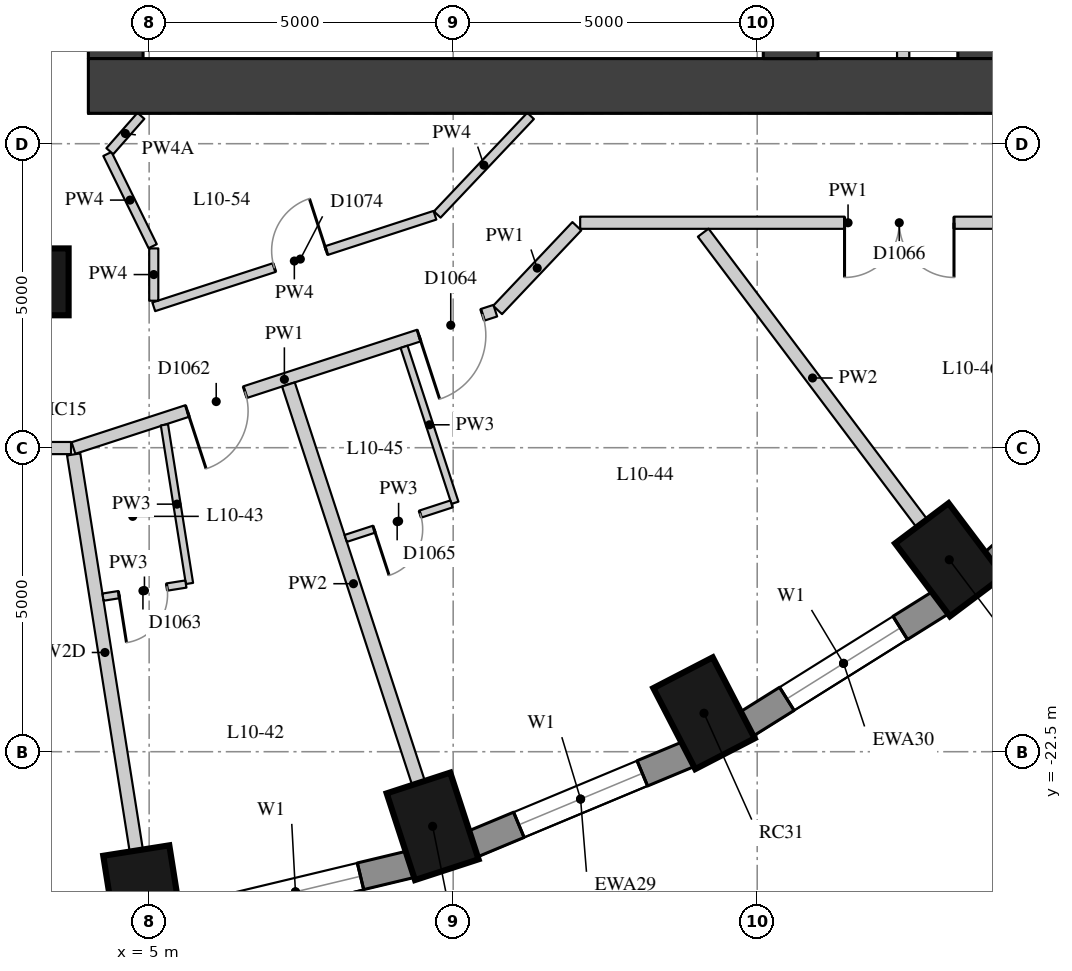
"""IFC4 building model, lengths in metres.
Left out: names, types, materials, properties, quantities, classifications, styles, units other than length and angle.
Written with IfcOpenShell. Run it as: python <this file> out.ifc"""

import sys

from ifc_helpers import new_model, si_unit, direction, frame, frame_2d, origin, origin_2d, place, context, subcontext, project, spatial, rectangle, extrude, element, fill, save


model = new_model("IFC4")
c1 = context("Model", 3, precision=1e-05, world=origin(), true_north=direction((0.0, 1.0)))
c2 = subcontext(c1, "Body", "Model", "MODEL_VIEW")
j1 = project(units=[si_unit("LENGTHUNIT", "METRE"), si_unit("PLANEANGLEUNIT", "RADIAN")], contexts=[c1])
p1 = place(None, origin())
s1 = spatial("IfcSite", under=j1, at=p1, CompositionType="ELEMENT")
p2 = place(p1, origin())
s2 = spatial("IfcBuilding", under=s1, at=p2, CompositionType="ELEMENT")
p3 = place(p2, frame((0.0, 0.0, 41.5)))
s3 = spatial("IfcBuildingStorey", under=s2, at=p3, CompositionType="ELEMENT", Elevation=41.5)
for number, where, z_axis, x_axis in (
    (1, (4.906, -24.866, 0.0), (0.0, 0.0, 1.0), (0.156, -0.988, 0.0)),
    (2, (9.662, -23.727, 0.0), (0.0, 0.0, 1.0), (0.31, -0.951, 0.0)),
    (3, (14.125, -21.867, 0.0), (0.0, 0.0, 1.0), (0.46, -0.888, 0.0)),
    (4, (18.159, -19.343, 0.0), (0.0, 0.0, 1.0), (0.601, -0.799, 0.0)),
):
    element("IfcColumn", number, at=place(p3, frame(where, z_axis=z_axis, x_axis=x_axis)), inside=s3, PredefinedType="COLUMN", context=c2, shape_type="SweptSolid", body=[
        extrude(rectangle(XDim=1.5, YDim=1.1, at=origin_2d()), origin(), (0.0, 0.0, 1.0), 3.3),
    ])
p4 = place(p3, frame((3.126, -14.772, 0.0), z_axis=(0.0, 0.0, 1.0), x_axis=(1.0, 0.0, 0.0)))
e5 = element("IfcColumn", 5, at=p4, inside=s3, PredefinedType="COLUMN", context=c2, shape_type="SweptSolid", body=[
    extrude(rectangle(XDim=1.1, YDim=1.1, at=origin_2d()), origin(), (0.0, 0.0, 1.0), 3.3),
])
p5 = place(p3, frame((5.504, -25.26, 0.0), z_axis=(0.0, 0.0, 1.0), x_axis=(0.972496561493, 0.232917233979, 0.0)))
e6 = element("IfcWall", 6, at=p5, inside=s3, PredefinedType="SOLIDWALL", context=c2, shape_type="SweptSolid", body=[
    extrude(rectangle(XDim=3.911, YDim=0.45, at=frame_2d((1.956, 0.0))), origin(), (0.0, 0.0, 1.0), 3.02),
])
p6 = place(p5, frame((0.855, 0.0, 0.4)))
e7 = element("IfcOpeningElement", 7, at=p6, cuts=e6, PredefinedType="OPENING", context=c2, shape_type="SweptSolid", body=[
    extrude(rectangle(XDim=2.2, YDim=1.75, at=frame_2d((1.1, 0.875))), frame((0.0, 0.235, 0.0), z_axis=(0.0, -1.0, 0.0), x_axis=(1.0, 0.0, 0.0)), (0.0, 0.0, 1.0), 0.47),
])
p7 = place(p3, frame((10.315, -24.021, 0.0), z_axis=(0.0, 0.0, 1.0), x_axis=(0.923031964282, 0.384723267966, 0.0)))
e8 = element("IfcWall", 8, at=p7, inside=s3, PredefinedType="SOLIDWALL", context=c2, shape_type="SweptSolid", body=[
    extrude(rectangle(XDim=3.856, YDim=0.45, at=frame_2d((1.928, 0.0))), origin(), (0.0, 0.0, 1.0), 3.02),
])
p8 = place(p7, frame((0.828, 0.0, 0.4)))
e9 = element("IfcOpeningElement", 9, at=p8, cuts=e8, PredefinedType="OPENING", context=c2, shape_type="SweptSolid", body=[
    extrude(rectangle(XDim=2.2, YDim=1.75, at=frame_2d((1.1, 0.875))), frame((0.0, 0.235, 0.0), z_axis=(0.0, -1.0, 0.0), x_axis=(1.0, 0.0, 0.0)), (0.0, 0.0, 1.0), 0.47),
])
p9 = place(p3, frame((14.817, -22.051, 0.0), z_axis=(0.0, 0.0, 1.0), x_axis=(0.847635480093, 0.530579016629, 0.0)))
e10 = element("IfcWall", 10, at=p9, inside=s3, PredefinedType="SOLIDWALL", context=c2, shape_type="SweptSolid", body=[
    extrude(rectangle(XDim=3.782, YDim=0.45, at=frame_2d((1.891, 0.0))), origin(), (0.0, 0.0, 1.0), 3.02),
])
p10 = place(p9, frame((0.791, 0.0, 0.4)))
e11 = element("IfcOpeningElement", 11, at=p10, cuts=e10, PredefinedType="OPENING", context=c2, shape_type="SweptSolid", body=[
    extrude(rectangle(XDim=2.2, YDim=1.75, at=frame_2d((1.1, 0.875))), frame((0.0, 0.235, 0.0), z_axis=(0.0, -1.0, 0.0), x_axis=(1.0, 0.0, 0.0)), (0.0, 0.0, 1.0), 0.47),
])
p11 = place(p3, frame((18.871, -19.407, 0.0), z_axis=(0.0, 0.0, 1.0), x_axis=(0.745526233716, 0.66647628228, 0.0)))
e12 = element("IfcWall", 12, at=p11, inside=s3, PredefinedType="SOLIDWALL", context=c2, shape_type="SweptSolid", body=[
    extrude(rectangle(XDim=3.697, YDim=0.45, at=frame_2d((1.848, 0.0))), origin(), (0.0, 0.0, 1.0), 3.02),
])
p12 = place(p3, frame((4.45, -11.1, 0.0), z_axis=(0.0, 0.0, 1.0), x_axis=(0.0, 1.0, 0.0)))
e13 = element("IfcWall", 13, at=p12, inside=s3, PredefinedType="SHEAR", context=c2, shape_type="SweptSolid", body=[
    extrude(rectangle(XDim=22.2, YDim=0.9, at=frame_2d((11.1, 0.0))), origin(), (0.0, 0.0, 1.0), 3.02),
])
p13 = place(p12, frame((2.35, 0.0, 0.0)))
e14 = element("IfcOpeningElement", 14, at=p13, cuts=e13, PredefinedType="OPENING", context=c2, shape_type="SweptSolid", body=[
    extrude(rectangle(XDim=1.5, YDim=2.1, at=frame_2d((0.75, 1.05))), frame((0.0, 0.46, 0.0), z_axis=(0.0, -1.0, 0.0), x_axis=(1.0, 0.0, 0.0)), (0.0, 0.0, 1.0), 0.92),
])
p14 = place(p12, frame((5.45, 0.0, 0.0)))
e15 = element("IfcOpeningElement", 15, at=p14, cuts=e13, PredefinedType="OPENING", context=c2, shape_type="SweptSolid", body=[
    extrude(rectangle(XDim=1.8, YDim=2.1, at=frame_2d((0.9, 1.05))), frame((0.0, 0.46, 0.0), z_axis=(0.0, -1.0, 0.0), x_axis=(1.0, 0.0, 0.0)), (0.0, 0.0, 1.0), 0.92),
])
p15 = place(p12, frame((7.95, 0.0, 0.0)))
e16 = element("IfcOpeningElement", 16, at=p15, cuts=e13, PredefinedType="OPENING", context=c2, shape_type="SweptSolid", body=[
    extrude(rectangle(XDim=1.1, YDim=2.1, at=frame_2d((0.55, 1.05))), frame((0.0, 0.46, 0.0), z_axis=(0.0, -1.0, 0.0), x_axis=(1.0, 0.0, 0.0)), (0.0, 0.0, 1.0), 0.92),
])
p16 = place(p12, frame((10.6, 0.0, 0.0)))
e17 = element("IfcOpeningElement", 17, at=p16, cuts=e13, PredefinedType="OPENING", context=c2, shape_type="SweptSolid", body=[
    extrude(rectangle(XDim=1.0, YDim=2.1, at=frame_2d((0.5, 1.05))), frame((0.0, 0.46, 0.0), z_axis=(0.0, -1.0, 0.0), x_axis=(1.0, 0.0, 0.0)), (0.0, 0.0, 1.0), 0.92),
])
p17 = place(p12, frame((13.15, 0.0, 0.0)))
e18 = element("IfcOpeningElement", 18, at=p17, cuts=e13, PredefinedType="OPENING", context=c2, shape_type="SweptSolid", body=[
    extrude(rectangle(XDim=1.1, YDim=2.1, at=frame_2d((0.55, 1.05))), frame((0.0, 0.46, 0.0), z_axis=(0.0, -1.0, 0.0), x_axis=(1.0, 0.0, 0.0)), (0.0, 0.0, 1.0), 0.92),
])
p18 = place(p12, frame((14.95, 0.0, 0.0)))
e19 = element("IfcOpeningElement", 19, at=p18, cuts=e13, PredefinedType="OPENING", context=c2, shape_type="SweptSolid", body=[
    extrude(rectangle(XDim=1.8, YDim=2.1, at=frame_2d((0.9, 1.05))), frame((0.0, 0.46, 0.0), z_axis=(0.0, -1.0, 0.0), x_axis=(1.0, 0.0, 0.0)), (0.0, 0.0, 1.0), 0.92),
])
p19 = place(p12, frame((18.35, 0.0, 0.0)))
e20 = element("IfcOpeningElement", 20, at=p19, cuts=e13, PredefinedType="OPENING", context=c2, shape_type="SweptSolid", body=[
    extrude(rectangle(XDim=1.5, YDim=2.1, at=frame_2d((0.75, 1.05))), frame((0.0, 0.46, 0.0), z_axis=(0.0, -1.0, 0.0), x_axis=(1.0, 0.0, 0.0)), (0.0, 0.0, 1.0), 0.92),
])
p20 = place(p3, frame((18.75, -11.1, 0.0), z_axis=(0.0, 0.0, 1.0), x_axis=(0.0, 1.0, 0.0)))
e21 = element("IfcWall", 21, at=p20, inside=s3, PredefinedType="SHEAR", context=c2, shape_type="SweptSolid", body=[
    extrude(rectangle(XDim=22.2, YDim=0.9, at=frame_2d((11.1, 0.0))), origin(), (0.0, 0.0, 1.0), 3.02),
])
p21 = place(p20, frame((15.675, 0.0, 0.0)))
e22 = element("IfcOpeningElement", 22, at=p21, cuts=e21, PredefinedType="OPENING", context=c2, shape_type="SweptSolid", body=[
    extrude(rectangle(XDim=1.5, YDim=2.1, at=frame_2d((0.75, 1.05))), frame((0.0, 0.46, 0.0), z_axis=(0.0, -1.0, 0.0), x_axis=(1.0, 0.0, 0.0)), (0.0, 0.0, 1.0), 0.92),
])
p22 = place(p20, frame((4.775, 0.0, 0.0)))
e23 = element("IfcOpeningElement", 23, at=p22, cuts=e21, PredefinedType="OPENING", context=c2, shape_type="SweptSolid", body=[
    extrude(rectangle(XDim=1.5, YDim=2.1, at=frame_2d((0.75, 1.05))), frame((0.0, 0.46, 0.0), z_axis=(0.0, -1.0, 0.0), x_axis=(1.0, 0.0, 0.0)), (0.0, 0.0, 1.0), 0.92),
])
p23 = place(p3, frame((4.0, -11.55, 0.0), z_axis=(0.0, 0.0, 1.0), x_axis=(1.0, 0.0, 0.0)))
e24 = element("IfcWall", 24, at=p23, inside=s3, PredefinedType="SHEAR", context=c2, shape_type="SweptSolid", body=[
    extrude(rectangle(XDim=15.2, YDim=0.9, at=frame_2d((7.6, 0.0))), origin(), (0.0, 0.0, 1.0), 3.02),
])
p24 = place(p3, frame((15.55, -11.1, 0.0), z_axis=(0.0, 0.0, 1.0), x_axis=(0.0, 1.0, 0.0)))
e25 = element("IfcWall", 25, at=p24, inside=s3, PredefinedType="SHEAR", context=c2, shape_type="SweptSolid", body=[
    extrude(rectangle(XDim=22.2, YDim=0.9, at=frame_2d((11.1, 0.0))), origin(), (0.0, 0.0, 1.0), 3.02),
])
p25 = place(p24, frame((15.6, 0.0, 0.0)))
e26 = element("IfcOpeningElement", 26, at=p25, cuts=e25, PredefinedType="OPENING", context=c2, shape_type="SweptSolid", body=[
    extrude(rectangle(XDim=1.0, YDim=2.1, at=frame_2d((0.5, 1.05))), frame((0.0, 0.46, 0.0), z_axis=(0.0, -1.0, 0.0), x_axis=(1.0, 0.0, 0.0)), (0.0, 0.0, 1.0), 0.92),
])
p26 = place(p24, frame((5.6, 0.0, 0.0)))
e27 = element("IfcOpeningElement", 27, at=p26, cuts=e25, PredefinedType="OPENING", context=c2, shape_type="SweptSolid", body=[
    extrude(rectangle(XDim=1.0, YDim=2.1, at=frame_2d((0.5, 1.05))), frame((0.0, 0.46, 0.0), z_axis=(0.0, -1.0, 0.0), x_axis=(1.0, 0.0, 0.0)), (0.0, 0.0, 1.0), 0.92),
])
p27 = place(p3, frame((17.4, -11.1, 0.0), z_axis=(0.0, 0.0, 1.0), x_axis=(0.0, 1.0, 0.0)))
e28 = element("IfcWall", 28, at=p27, inside=s3, PredefinedType="PARTITIONING", context=c2, shape_type="SweptSolid", body=[
    extrude(rectangle(XDim=4.2, YDim=0.2, at=frame_2d((2.1, 0.0))), origin(), (0.0, 0.0, 1.0), 3.02),
])
p28 = place(p3, frame((20.9, -13.8, 0.0), z_axis=(0.0, 0.0, 1.0), x_axis=(-1.0, 0.0, 0.0)))
e29 = element("IfcWall", 29, at=p28, inside=s3, PredefinedType="PARTITIONING", context=c2, shape_type="SweptSolid", body=[
    extrude(rectangle(XDim=8.812, YDim=0.2, at=frame_2d((4.406, 0.0))), origin(), (0.0, 0.0, 1.0), 3.02),
])
p29 = place(p28, frame((2.664, 0.0, 0.0)))
e30 = element("IfcOpeningElement", 30, at=p29, cuts=e29, PredefinedType="OPENING", context=c2, shape_type="SweptSolid", body=[
    extrude(rectangle(XDim=1.8, YDim=2.1, at=frame_2d((0.9, 1.05))), frame((0.0, 0.11, 0.0), z_axis=(0.0, -1.0, 0.0), x_axis=(1.0, 0.0, 0.0)), (0.0, 0.0, 1.0), 0.22),
])
p30 = place(p3, frame((12.034, -13.858, 0.0), z_axis=(0.0, 0.0, 1.0), x_axis=(-0.687458821662, -0.726223359938, 0.0)))
e31 = element("IfcWall", 31, at=p30, inside=s3, PredefinedType="PARTITIONING", context=c2, shape_type="SweptSolid", body=[
    extrude(rectangle(XDim=1.896, YDim=0.2, at=frame_2d((0.948, 0.0))), origin(), (0.0, 0.0, 1.0), 3.02),
])
p31 = place(p3, frame((10.692, -15.247, 0.0), z_axis=(0.0, 0.0, 1.0), x_axis=(-0.950852414815, -0.309644449718, 0.0)))
e32 = element("IfcWall", 32, at=p31, inside=s3, PredefinedType="PARTITIONING", context=c2, shape_type="SweptSolid", body=[
    extrude(rectangle(XDim=7.296, YDim=0.2, at=frame_2d((3.648, 0.0))), origin(), (0.0, 0.0, 1.0), 3.02),
])
p32 = place(p31, frame((4.327, 0.0, 0.0)))
e33 = element("IfcOpeningElement", 33, at=p32, cuts=e32, PredefinedType="OPENING", context=c2, shape_type="SweptSolid", body=[
    extrude(rectangle(XDim=1.0, YDim=2.1, at=frame_2d((0.5, 1.05))), frame((0.0, 0.11, 0.0), z_axis=(0.0, -1.0, 0.0), x_axis=(1.0, 0.0, 0.0)), (0.0, 0.0, 1.0), 0.22),
])
p33 = place(p31, frame((0.22, 0.0, 0.0)))
e34 = element("IfcOpeningElement", 34, at=p33, cuts=e32, PredefinedType="OPENING", context=c2, shape_type="SweptSolid", body=[
    extrude(rectangle(XDim=1.1, YDim=2.1, at=frame_2d((0.55, 1.05))), frame((0.0, 0.11, 0.0), z_axis=(0.0, -1.0, 0.0), x_axis=(1.0, 0.0, 0.0)), (0.0, 0.0, 1.0), 0.22),
])
p34 = place(p3, frame((3.715, -17.506, 0.0), z_axis=(0.0, 0.0, 1.0), x_axis=(-1.0, 0.0, 0.0)))
e35 = element("IfcWall", 35, at=p34, inside=s3, PredefinedType="PARTITIONING", context=c2, shape_type="SweptSolid", body=[
    extrude(rectangle(XDim=7.471, YDim=0.2, at=frame_2d((3.735, 0.0))), origin(), (0.0, 0.0, 1.0), 3.02),
])
p35 = place(p34, frame((4.538, 0.0, 0.0)))
e36 = element("IfcOpeningElement", 36, at=p35, cuts=e35, PredefinedType="OPENING", context=c2, shape_type="SweptSolid", body=[
    extrude(rectangle(XDim=1.0, YDim=2.1, at=frame_2d((0.5, 1.05))), frame((0.0, 0.11, 0.0), z_axis=(0.0, -1.0, 0.0), x_axis=(1.0, 0.0, 0.0)), (0.0, 0.0, 1.0), 0.22),
])
p36 = place(p34, frame((0.743, 0.0, 0.0)))
e37 = element("IfcOpeningElement", 37, at=p36, cuts=e35, PredefinedType="OPENING", context=c2, shape_type="SweptSolid", body=[
    extrude(rectangle(XDim=1.0, YDim=2.1, at=frame_2d((0.5, 1.05))), frame((0.0, 0.11, 0.0), z_axis=(0.0, -1.0, 0.0), x_axis=(1.0, 0.0, 0.0)), (0.0, 0.0, 1.0), 0.22),
])
p37 = place(p3, frame((11.273, -12.043, 0.0), z_axis=(0.0, 0.0, 1.0), x_axis=(-0.687435283659, -0.7262456408, 0.0)))
e38 = element("IfcWall", 38, at=p37, inside=s3, PredefinedType="PARTITIONING", context=c2, shape_type="SweptSolid", body=[
    extrude(rectangle(XDim=2.233, YDim=0.15, at=frame_2d((1.117, 0.0))), origin(), (0.0, 0.0, 1.0), 3.02),
])
p38 = place(p3, frame((9.7, -13.677, 0.0), z_axis=(0.0, 0.0, 1.0), x_axis=(-0.950854246358, -0.309638825381, 0.0)))
e39 = element("IfcWall", 39, at=p38, inside=s3, PredefinedType="PARTITIONING", context=c2, shape_type="SweptSolid", body=[
    extrude(rectangle(XDim=4.863, YDim=0.15, at=frame_2d((2.432, 0.0))), origin(), (0.0, 0.0, 1.0), 3.02),
])
p39 = place(p38, frame((1.878, 0.0, 0.0)))
e40 = element("IfcOpeningElement", 40, at=p39, cuts=e39, PredefinedType="OPENING", context=c2, shape_type="SweptSolid", body=[
    extrude(rectangle(XDim=0.9, YDim=2.1, at=frame_2d((0.45, 1.05))), frame((0.0, 0.085, 0.0), z_axis=(0.0, -1.0, 0.0), x_axis=(1.0, 0.0, 0.0)), (0.0, 0.0, 1.0), 0.17),
])
p40 = place(p3, frame((5.076, -15.083, 0.0), z_axis=(0.0, 0.0, 1.0), x_axis=(0.0, 1.0, 0.0)))
e41 = element("IfcWall", 41, at=p40, inside=s3, PredefinedType="PARTITIONING", context=c2, shape_type="SweptSolid", body=[
    extrude(rectangle(XDim=0.86, YDim=0.15, at=frame_2d((0.43, 0.0))), origin(), (0.0, 0.0, 1.0), 3.02),
])
p41 = place(p3, frame((5.058, -14.186, 0.0), z_axis=(0.0, 0.0, 1.0), x_axis=(-0.440556792244, 0.897724742228, 0.0)))
e42 = element("IfcWall", 42, at=p41, inside=s3, PredefinedType="PARTITIONING", context=c2, shape_type="SweptSolid", body=[
    extrude(rectangle(XDim=1.69, YDim=0.15, at=frame_2d((0.845, 0.0))), origin(), (0.0, 0.0, 1.0), 3.02),
])
p42 = place(p3, frame((4.353, -12.623, 0.0), z_axis=(0.0, 0.0, 1.0), x_axis=(0.660265480509, 0.751032286422, 0.0)))
e43 = element("IfcWall", 43, at=p42, inside=s3, PredefinedType="PARTITIONING", context=c2, shape_type="SweptSolid", body=[
    extrude(rectangle(XDim=0.775, YDim=0.15, at=frame_2d((0.387, 0.0))), origin(), (0.0, 0.0, 1.0), 2.57),
])
p43 = place(p3, frame((4.788, -24.125, 0.0), z_axis=(0.0, 0.0, 1.0), x_axis=(-0.156122228938, 0.987737743347, 0.0)))
e44 = element("IfcWall", 44, at=p43, inside=s3, PredefinedType="PARTITIONING", context=c2, shape_type="SweptSolid", body=[
    extrude(rectangle(XDim=6.596, YDim=0.22, at=frame_2d((3.298, 0.0))), origin(), (0.0, 0.0, 1.0), 2.47),
])
p44 = place(p3, frame((9.429, -23.014, 0.0), z_axis=(0.0, 0.0, 1.0), x_axis=(-0.310230029144, 0.950661521793, 0.0)))
e45 = element("IfcWall", 45, at=p44, inside=s3, PredefinedType="PARTITIONING", context=c2, shape_type="SweptSolid", body=[
    extrude(rectangle(XDim=6.895, YDim=0.22, at=frame_2d((3.447, 0.0))), origin(), (0.0, 0.0, 1.0), 3.02),
])
p45 = place(p3, frame((17.708, -18.743, 0.0), z_axis=(0.0, 0.0, 1.0), x_axis=(-0.601181461694, 0.799112539081, 0.0)))
e46 = element("IfcWall", 46, at=p45, inside=s3, PredefinedType="PARTITIONING", context=c2, shape_type="SweptSolid", body=[
    extrude(rectangle(XDim=5.981, YDim=0.22, at=frame_2d((2.99, 0.0))), origin(), (0.0, 0.0, 1.0), 3.02),
])
p46 = place(p3, frame((5.251, -17.124, 0.0), z_axis=(0.0, 0.0, 1.0), x_axis=(0.156104955519, -0.987740473435, 0.0)))
e47 = element("IfcWall", 47, at=p46, inside=s3, PredefinedType="PARTITIONING", context=c2, shape_type="SweptSolid", body=[
    extrude(rectangle(XDim=2.642, YDim=0.12, at=frame_2d((1.321, 0.0))), origin(), (0.0, 0.0, 1.0), 3.02),
])
p47 = place(p3, frame((9.192, -15.84, 0.0), z_axis=(0.0, 0.0, 1.0), x_axis=(0.310278328391, -0.950645758909, 0.0)))
e48 = element("IfcWall", 48, at=p47, inside=s3, PredefinedType="PARTITIONING", context=c2, shape_type="SweptSolid", body=[
    extrude(rectangle(XDim=2.699, YDim=0.12, at=frame_2d((1.35, 0.0))), origin(), (0.0, 0.0, 1.0), 3.02),
])
p48 = place(p3, frame((5.604, -19.742, 0.0), z_axis=(0.0, 0.0, 1.0), x_axis=(-0.987722767831, -0.156216945011, 0.0)))
e49 = element("IfcWall", 49, at=p48, inside=s3, PredefinedType="PARTITIONING", context=c2, shape_type="SweptSolid", body=[
    extrude(rectangle(XDim=1.38, YDim=0.12, at=frame_2d((0.69, 0.0))), origin(), (0.0, 0.0, 1.0), 3.02),
])
p49 = place(p48, frame((0.315, 0.0, 0.0)))
e50 = element("IfcOpeningElement", 50, at=p49, cuts=e49, PredefinedType="OPENING", context=c2, shape_type="SweptSolid", body=[
    extrude(rectangle(XDim=0.8, YDim=2.1, at=frame_2d((0.4, 1.05))), frame((0.0, 0.07, 0.0), z_axis=(0.0, -1.0, 0.0), x_axis=(1.0, 0.0, 0.0)), (0.0, 0.0, 1.0), 0.14),
])
p50 = place(p3, frame((9.972, -18.425, 0.0), z_axis=(0.0, 0.0, 1.0), x_axis=(-0.950678536911, -0.31017788357, 0.0)))
e51 = element("IfcWall", 51, at=p50, inside=s3, PredefinedType="PARTITIONING", context=c2, shape_type="SweptSolid", body=[
    extrude(rectangle(XDim=1.83, YDim=0.12, at=frame_2d((0.915, 0.0))), origin(), (0.0, 0.0, 1.0), 3.02),
])
p51 = place(p50, frame((0.54, 0.0, 0.0)))
e52 = element("IfcOpeningElement", 52, at=p51, cuts=e51, PredefinedType="OPENING", context=c2, shape_type="SweptSolid", body=[
    extrude(rectangle(XDim=0.8, YDim=2.1, at=frame_2d((0.4, 1.05))), frame((0.0, 0.07, 0.0), z_axis=(0.0, -1.0, 0.0), x_axis=(1.0, 0.0, 0.0)), (0.0, 0.0, 1.0), 0.14),
])
p52 = place(p6, origin())
e53 = element("IfcWindow", 53, at=p52, inside=s3, PartitioningType="SINGLE_PANEL", PredefinedType="WINDOW", context=c2, shape_type="SweptSolid", body=[
    extrude(rectangle(XDim=2.2, YDim=1.75, at=frame_2d((1.1, 0.875))), frame((0.0, 0.035, 0.0), z_axis=(0.0, -1.0, 0.0), x_axis=(1.0, 0.0, 0.0)), (0.0, 0.0, 1.0), 0.06),
])
fill(e7, e53)
p53 = place(p8, origin())
e54 = element("IfcWindow", 54, at=p53, inside=s3, PartitioningType="SINGLE_PANEL", PredefinedType="WINDOW", context=c2, shape_type="SweptSolid", body=[
    extrude(rectangle(XDim=2.2, YDim=1.75, at=frame_2d((1.1, 0.875))), frame((0.0, 0.035, 0.0), z_axis=(0.0, -1.0, 0.0), x_axis=(1.0, 0.0, 0.0)), (0.0, 0.0, 1.0), 0.06),
])
fill(e9, e54)
p54 = place(p10, origin())
e55 = element("IfcWindow", 55, at=p54, inside=s3, PartitioningType="SINGLE_PANEL", PredefinedType="WINDOW", context=c2, shape_type="SweptSolid", body=[
    extrude(rectangle(XDim=2.2, YDim=1.75, at=frame_2d((1.1, 0.875))), frame((0.0, 0.035, 0.0), z_axis=(0.0, -1.0, 0.0), x_axis=(1.0, 0.0, 0.0)), (0.0, 0.0, 1.0), 0.06),
])
fill(e11, e55)
p55 = place(p32, origin())
e56 = element("IfcDoor", 56, at=p55, inside=s3, OperationType="SINGLE_SWING_RIGHT", PredefinedType="DOOR", context=c2, shape_type="SweptSolid", body=[
    extrude(rectangle(XDim=1.0, YDim=2.1, at=frame_2d((0.5, 1.05))), frame((0.0, 0.025, 0.0), z_axis=(0.0, -1.0, 0.0), x_axis=(1.0, 0.0, 0.0)), (0.0, 0.0, 1.0), 0.05),
])
fill(e33, e56)
p56 = place(p49, origin())
e57 = element("IfcDoor", 57, at=p56, inside=s3, OperationType="SINGLE_SWING_RIGHT", PredefinedType="DOOR", context=c2, shape_type="SweptSolid", body=[
    extrude(rectangle(XDim=0.8, YDim=2.1, at=frame_2d((0.4, 1.05))), frame((0.0, 0.025, 0.0), z_axis=(0.0, -1.0, 0.0), x_axis=(1.0, 0.0, 0.0)), (0.0, 0.0, 1.0), 0.05),
])
fill(e50, e57)
p57 = place(p33, origin())
e58 = element("IfcDoor", 58, at=p57, inside=s3, OperationType="SINGLE_SWING_RIGHT", PredefinedType="DOOR", context=c2, shape_type="SweptSolid", body=[
    extrude(rectangle(XDim=1.1, YDim=2.1, at=frame_2d((0.55, 1.05))), frame((0.0, 0.025, 0.0), z_axis=(0.0, -1.0, 0.0), x_axis=(1.0, 0.0, 0.0)), (0.0, 0.0, 1.0), 0.05),
])
fill(e34, e58)
p58 = place(p51, origin())
e59 = element("IfcDoor", 59, at=p58, inside=s3, OperationType="SINGLE_SWING_RIGHT", PredefinedType="DOOR", context=c2, shape_type="SweptSolid", body=[
    extrude(rectangle(XDim=0.8, YDim=2.1, at=frame_2d((0.4, 1.05))), frame((0.0, 0.025, 0.0), z_axis=(0.0, -1.0, 0.0), x_axis=(1.0, 0.0, 0.0)), (0.0, 0.0, 1.0), 0.05),
])
fill(e52, e59)
p59 = place(p29, origin())
e60 = element("IfcDoor", 60, at=p59, inside=s3, OperationType="DOUBLE_DOOR_SINGLE_SWING", PredefinedType="DOOR", context=c2, shape_type="SweptSolid", body=[
    extrude(rectangle(XDim=1.8, YDim=2.1, at=frame_2d((0.9, 1.05))), frame((0.0, 0.025, 0.0), z_axis=(0.0, -1.0, 0.0), x_axis=(1.0, 0.0, 0.0)), (0.0, 0.0, 1.0), 0.05),
])
fill(e30, e60)
p60 = place(p39, origin())
e61 = element("IfcDoor", 61, at=p60, inside=s3, OperationType="SINGLE_SWING_RIGHT", PredefinedType="DOOR", context=c2, shape_type="SweptSolid", body=[
    extrude(rectangle(XDim=0.9, YDim=2.1, at=frame_2d((0.45, 1.05))), frame((0.0, 0.025, 0.0), z_axis=(0.0, -1.0, 0.0), x_axis=(1.0, 0.0, 0.0)), (0.0, 0.0, 1.0), 0.05),
])
fill(e40, e61)
save(model, sys.argv[1])
